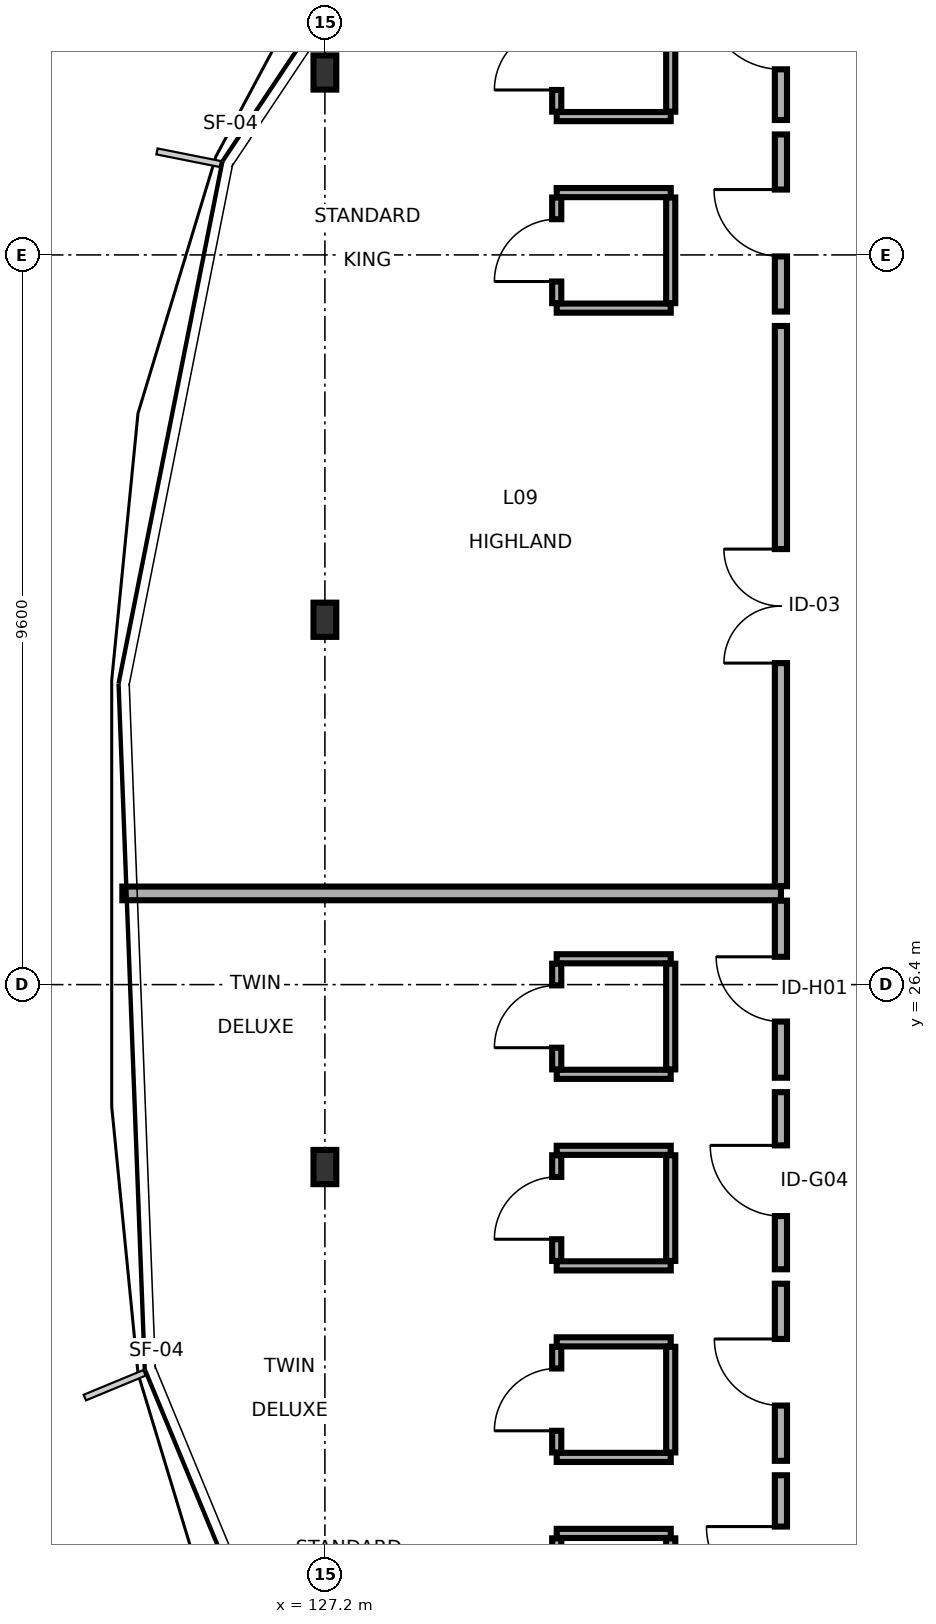
"""IFC4 building model, lengths in metres.
Left out: names, types, materials, properties, quantities, classifications, styles, units other than length and angle.
Written with IfcOpenShell. Run it as: python <this file> out.ifc"""

import sys

from ifc_helpers import new_model, si_unit, direction, frame, frame_2d, origin, origin_2d, place, context, subcontext, project, spatial, rectangle, i_section, extrude, element, fill, save


model = new_model("IFC4")
c1 = context("Model", 3, precision=1e-05, world=origin(), true_north=direction((0.0, 1.0)))
c2 = subcontext(c1, "Body", "Model", "MODEL_VIEW")
j1 = project(units=[si_unit("LENGTHUNIT", "METRE"), si_unit("PLANEANGLEUNIT", "RADIAN")], contexts=[c1])
p1 = place(None, origin())
s1 = spatial("IfcSite", under=j1, at=p1, CompositionType="ELEMENT")
p2 = place(p1, origin())
s2 = spatial("IfcBuilding", under=s1, at=p2, CompositionType="ELEMENT")
p3 = place(p2, frame((0.0, 0.0, 31.7)))
s3 = spatial("IfcBuildingStorey", under=s2, at=p3, CompositionType="ELEMENT", Elevation=31.7)
for number, where, z_axis, x_axis in (
    (1, (127.2, 38.4, 0.0), (0.0, 0.0, 1.0), (1.0, 0.0, 0.0)),
    (2, (127.2, 31.2, 0.0), (0.0, 0.0, 1.0), (1.0, 0.0, 0.0)),
    (3, (127.2, 24.0, 0.0), (0.0, 0.0, 1.0), (1.0, 0.0, 0.0)),
):
    element("IfcColumn", number, at=place(p3, frame(where, z_axis=z_axis, x_axis=x_axis)), inside=s3, PredefinedType="COLUMN", context=c2, shape_type="SweptSolid", body=[
        extrude(i_section(OverallWidth=0.3, OverallDepth=0.45, WebThickness=0.014, FlangeThickness=0.026, FilletRadius=0.027, at=origin_2d()), origin(), (0.0, 0.0, 1.0), 3.4),
    ])
p4 = place(p3, frame((133.2, 27.695, 0.0), z_axis=(0.0, 0.0, 1.0), x_axis=(0.0, 1.0, 0.0)))
e4 = element("IfcWall", 4, at=p4, inside=s3, PredefinedType="PARTITIONING", context=c2, shape_type="SweptSolid", body=[
    extrude(rectangle(XDim=7.37, YDim=0.16, at=frame_2d((3.685, 0.0))), origin(), (0.0, 0.0, 1.0), 2.755),
])
p5 = place(p4, frame((2.935, 0.0, 0.0)))
e5 = element("IfcOpeningElement", 5, at=p5, cuts=e4, PredefinedType="OPENING", context=c2, shape_type="SweptSolid", body=[
    extrude(rectangle(XDim=1.5, YDim=2.25, at=frame_2d((0.75, 1.125))), frame((0.0, 0.09, 0.0), z_axis=(0.0, -1.0, 0.0), x_axis=(1.0, 0.0, 0.0)), (0.0, 0.0, 1.0), 0.18),
])
p6 = place(p3, frame((133.2, 37.775, 0.0), z_axis=(0.0, 0.0, 1.0), x_axis=(0.0, 1.0, 0.0)))
e6 = element("IfcWall", 6, at=p6, inside=s3, PredefinedType="PARTITIONING", context=c2, shape_type="SweptSolid", body=[
    extrude(rectangle(XDim=2.33, YDim=0.16, at=frame_2d((1.165, 0.0))), origin(), (0.0, 0.0, 1.0), 2.755),
])
p7 = place(p6, frame((0.667, 0.0, 0.0)))
e7 = element("IfcOpeningElement", 7, at=p7, cuts=e6, PredefinedType="OPENING", context=c2, shape_type="SweptSolid", body=[
    extrude(rectangle(XDim=0.996, YDim=2.1, at=frame_2d((0.498, 1.05))), frame((0.0, 0.09, 0.0), z_axis=(0.0, -1.0, 0.0), x_axis=(1.0, 0.0, 0.0)), (0.0, 0.0, 1.0), 0.18),
])
p8 = place(p3, frame((130.25, 37.82, 0.0), z_axis=(0.0, 0.0, 1.0), x_axis=(1.0, 0.0, 0.0)))
e8 = element("IfcWall", 8, at=p8, inside=s3, PredefinedType="PARTITIONING", context=c2, shape_type="SweptSolid", body=[
    extrude(rectangle(XDim=1.5, YDim=0.12, at=frame_2d((0.75, 0.0))), origin(), (0.0, 0.0, 1.0), 3.17),
])
p9 = place(p3, frame((130.25, 37.885, 0.0), z_axis=(0.0, 0.0, 1.0), x_axis=(0.0, 1.0, 0.0)))
e9 = element("IfcWall", 9, at=p9, inside=s3, PredefinedType="PARTITIONING", context=c2, shape_type="SweptSolid", body=[
    extrude(rectangle(XDim=1.39, YDim=0.12, at=frame_2d((0.695, 0.0))), origin(), (0.0, 0.0, 1.0), 2.755),
])
p10 = place(p9, frame((0.285, 0.0, 0.0)))
e10 = element("IfcOpeningElement", 10, at=p10, cuts=e9, PredefinedType="OPENING", context=c2, shape_type="SweptSolid", body=[
    extrude(rectangle(XDim=0.82, YDim=2.08, at=frame_2d((0.41, 1.04))), frame((0.0, 0.07, 0.0), z_axis=(0.0, -1.0, 0.0), x_axis=(1.0, 0.0, 0.0)), (0.0, 0.0, 1.0), 0.14),
])
p11 = place(p3, frame((131.75, 37.885, 0.0), z_axis=(0.0, 0.0, 1.0), x_axis=(0.0, 1.0, 0.0)))
e11 = element("IfcWall", 11, at=p11, inside=s3, PredefinedType="PARTITIONING", context=c2, shape_type="SweptSolid", body=[
    extrude(rectangle(XDim=1.39, YDim=0.12, at=frame_2d((0.695, 0.0))), origin(), (0.0, 0.0, 1.0), 2.755),
])
p12 = place(p3, frame((133.2, 35.255, 0.0), z_axis=(0.0, 0.0, 1.0), x_axis=(0.0, 1.0, 0.0)))
e12 = element("IfcWall", 12, at=p12, inside=s3, PredefinedType="PARTITIONING", context=c2, shape_type="SweptSolid", body=[
    extrude(rectangle(XDim=2.33, YDim=0.16, at=frame_2d((1.165, 0.0))), origin(), (0.0, 0.0, 1.0), 3.17),
])
p13 = place(p12, frame((0.725, 0.0, 0.0)))
e13 = element("IfcOpeningElement", 13, at=p13, cuts=e12, PredefinedType="OPENING", context=c2, shape_type="SweptSolid", body=[
    extrude(rectangle(XDim=0.88, YDim=2.05, at=frame_2d((0.44, 1.025))), frame((0.0, 0.09, 0.0), z_axis=(0.0, -1.0, 0.0), x_axis=(1.0, 0.0, 0.0)), (0.0, 0.0, 1.0), 0.18),
])
for number, where, z_axis, x_axis in (
    (14, (130.25, 35.3, 0.0), (0.0, 0.0, 1.0), (1.0, 0.0, 0.0)),
    (15, (130.25, 36.82, 0.0), (0.0, 0.0, 1.0), (1.0, 0.0, 0.0)),
):
    element("IfcWall", number, at=place(p3, frame(where, z_axis=z_axis, x_axis=x_axis)), inside=s3, PredefinedType="PARTITIONING", context=c2, shape_type="SweptSolid", body=[
        extrude(rectangle(XDim=1.5, YDim=0.12, at=frame_2d((0.75, 0.0))), origin(), (0.0, 0.0, 1.0), 3.17),
    ])
p14 = place(p3, frame((130.25, 35.365, 0.0), z_axis=(0.0, 0.0, 1.0), x_axis=(0.0, 1.0, 0.0)))
e16 = element("IfcWall", 16, at=p14, inside=s3, PredefinedType="PARTITIONING", context=c2, shape_type="SweptSolid", body=[
    extrude(rectangle(XDim=1.39, YDim=0.12, at=frame_2d((0.695, 0.0))), origin(), (0.0, 0.0, 1.0), 3.17),
])
p15 = place(p14, frame((0.285, 0.0, 0.0)))
e17 = element("IfcOpeningElement", 17, at=p15, cuts=e16, PredefinedType="OPENING", context=c2, shape_type="SweptSolid", body=[
    extrude(rectangle(XDim=0.82, YDim=2.08, at=frame_2d((0.41, 1.04))), frame((0.0, 0.07, 0.0), z_axis=(0.0, -1.0, 0.0), x_axis=(1.0, 0.0, 0.0)), (0.0, 0.0, 1.0), 0.14),
])
p16 = place(p3, frame((131.75, 35.365, 0.0), z_axis=(0.0, 0.0, 1.0), x_axis=(0.0, 1.0, 0.0)))
e18 = element("IfcWall", 18, at=p16, inside=s3, PredefinedType="PARTITIONING", context=c2, shape_type="SweptSolid", body=[
    extrude(rectangle(XDim=1.39, YDim=0.12, at=frame_2d((0.695, 0.0))), origin(), (0.0, 0.0, 1.0), 3.17),
])
p17 = place(p3, frame((133.2, 25.175, 0.0), z_axis=(0.0, 0.0, 1.0), x_axis=(0.0, 1.0, 0.0)))
e19 = element("IfcWall", 19, at=p17, inside=s3, PredefinedType="PARTITIONING", context=c2, shape_type="SweptSolid", body=[
    extrude(rectangle(XDim=2.33, YDim=0.16, at=frame_2d((1.165, 0.0))), origin(), (0.0, 0.0, 1.0), 3.17),
])
p18 = place(p17, frame((0.739, 0.0, 0.0)))
e20 = element("IfcOpeningElement", 20, at=p18, cuts=e19, PredefinedType="OPENING", context=c2, shape_type="SweptSolid", body=[
    extrude(rectangle(XDim=0.852, YDim=2.1, at=frame_2d((0.426, 1.05))), frame((0.0, 0.09, 0.0), z_axis=(0.0, -1.0, 0.0), x_axis=(1.0, 0.0, 0.0)), (0.0, 0.0, 1.0), 0.18),
])
for number, where, z_axis, x_axis in (
    (21, (130.25, 25.22, 0.0), (0.0, 0.0, 1.0), (1.0, 0.0, 0.0)),
    (22, (130.25, 26.74, 0.0), (0.0, 0.0, 1.0), (1.0, 0.0, 0.0)),
):
    element("IfcWall", number, at=place(p3, frame(where, z_axis=z_axis, x_axis=x_axis)), inside=s3, PredefinedType="PARTITIONING", context=c2, shape_type="SweptSolid", body=[
        extrude(rectangle(XDim=1.5, YDim=0.12, at=frame_2d((0.75, 0.0))), origin(), (0.0, 0.0, 1.0), 3.17),
    ])
p19 = place(p3, frame((130.25, 25.285, 0.0), z_axis=(0.0, 0.0, 1.0), x_axis=(0.0, 1.0, 0.0)))
e23 = element("IfcWall", 23, at=p19, inside=s3, PredefinedType="PARTITIONING", context=c2, shape_type="SweptSolid", body=[
    extrude(rectangle(XDim=1.39, YDim=0.12, at=frame_2d((0.695, 0.0))), origin(), (0.0, 0.0, 1.0), 3.17),
])
p20 = place(p19, frame((0.285, 0.0, 0.0)))
e24 = element("IfcOpeningElement", 24, at=p20, cuts=e23, PredefinedType="OPENING", context=c2, shape_type="SweptSolid", body=[
    extrude(rectangle(XDim=0.82, YDim=2.08, at=frame_2d((0.41, 1.04))), frame((0.0, 0.07, 0.0), z_axis=(0.0, -1.0, 0.0), x_axis=(1.0, 0.0, 0.0)), (0.0, 0.0, 1.0), 0.14),
])
p21 = place(p3, frame((131.75, 25.285, 0.0), z_axis=(0.0, 0.0, 1.0), x_axis=(0.0, 1.0, 0.0)))
e25 = element("IfcWall", 25, at=p21, inside=s3, PredefinedType="PARTITIONING", context=c2, shape_type="SweptSolid", body=[
    extrude(rectangle(XDim=1.39, YDim=0.12, at=frame_2d((0.695, 0.0))), origin(), (0.0, 0.0, 1.0), 3.17),
])
p22 = place(p3, frame((124.535, 27.6, 0.0), z_axis=(0.0, 0.0, 1.0), x_axis=(1.0, 0.0, 0.0)))
e26 = element("IfcWall", 26, at=p22, inside=s3, PredefinedType="PARTITIONING", context=c2, shape_type="SweptSolid", body=[
    extrude(rectangle(XDim=8.665, YDim=0.18, at=frame_2d((4.333, 0.0))), origin(), (0.0, 0.0, 1.0), 2.655),
])
p23 = place(p3, frame((133.2, 22.655, 0.0), z_axis=(0.0, 0.0, 1.0), x_axis=(0.0, 1.0, 0.0)))
e27 = element("IfcWall", 27, at=p23, inside=s3, PredefinedType="PARTITIONING", context=c2, shape_type="SweptSolid", body=[
    extrude(rectangle(XDim=2.33, YDim=0.16, at=frame_2d((1.165, 0.0))), origin(), (0.0, 0.0, 1.0), 2.755),
])
p24 = place(p23, frame((0.7, 0.0, 0.0)))
e28 = element("IfcOpeningElement", 28, at=p24, cuts=e27, PredefinedType="OPENING", context=c2, shape_type="SweptSolid", body=[
    extrude(rectangle(XDim=0.93, YDim=2.05, at=frame_2d((0.465, 1.025))), frame((0.0, 0.09, 0.0), z_axis=(0.0, -1.0, 0.0), x_axis=(1.0, 0.0, 0.0)), (0.0, 0.0, 1.0), 0.18),
])
p25 = place(p3, frame((130.25, 22.7, 0.0), z_axis=(0.0, 0.0, 1.0), x_axis=(1.0, 0.0, 0.0)))
e29 = element("IfcWall", 29, at=p25, inside=s3, PredefinedType="PARTITIONING", context=c2, shape_type="SweptSolid", body=[
    extrude(rectangle(XDim=1.5, YDim=0.12, at=frame_2d((0.75, 0.0))), origin(), (0.0, 0.0, 1.0), 3.17),
])
p26 = place(p3, frame((130.25, 24.22, 0.0), z_axis=(0.0, 0.0, 1.0), x_axis=(1.0, 0.0, 0.0)))
e30 = element("IfcWall", 30, at=p26, inside=s3, PredefinedType="PARTITIONING", context=c2, shape_type="SweptSolid", body=[
    extrude(rectangle(XDim=1.5, YDim=0.12, at=frame_2d((0.75, 0.0))), origin(), (0.0, 0.0, 1.0), 2.755),
])
p27 = place(p3, frame((130.25, 22.765, 0.0), z_axis=(0.0, 0.0, 1.0), x_axis=(0.0, 1.0, 0.0)))
e31 = element("IfcWall", 31, at=p27, inside=s3, PredefinedType="PARTITIONING", context=c2, shape_type="SweptSolid", body=[
    extrude(rectangle(XDim=1.39, YDim=0.12, at=frame_2d((0.695, 0.0))), origin(), (0.0, 0.0, 1.0), 2.755),
])
p28 = place(p27, frame((0.285, 0.0, 0.0)))
e32 = element("IfcOpeningElement", 32, at=p28, cuts=e31, PredefinedType="OPENING", context=c2, shape_type="SweptSolid", body=[
    extrude(rectangle(XDim=0.82, YDim=2.08, at=frame_2d((0.41, 1.04))), frame((0.0, 0.07, 0.0), z_axis=(0.0, -1.0, 0.0), x_axis=(1.0, 0.0, 0.0)), (0.0, 0.0, 1.0), 0.14),
])
p29 = place(p3, frame((131.75, 22.765, 0.0), z_axis=(0.0, 0.0, 1.0), x_axis=(0.0, 1.0, 0.0)))
e33 = element("IfcWall", 33, at=p29, inside=s3, PredefinedType="PARTITIONING", context=c2, shape_type="SweptSolid", body=[
    extrude(rectangle(XDim=1.39, YDim=0.12, at=frame_2d((0.695, 0.0))), origin(), (0.0, 0.0, 1.0), 2.755),
])
p30 = place(p3, frame((133.2, 20.135, 0.0), z_axis=(0.0, 0.0, 1.0), x_axis=(0.0, 1.0, 0.0)))
e34 = element("IfcWall", 34, at=p30, inside=s3, PredefinedType="PARTITIONING", context=c2, shape_type="SweptSolid", body=[
    extrude(rectangle(XDim=2.33, YDim=0.16, at=frame_2d((1.165, 0.0))), origin(), (0.0, 0.0, 1.0), 3.17),
])
p31 = place(p30, frame((0.727, 0.0, 0.0)))
e35 = element("IfcOpeningElement", 35, at=p31, cuts=e34, PredefinedType="OPENING", context=c2, shape_type="SweptSolid", body=[
    extrude(rectangle(XDim=0.876, YDim=2.16, at=frame_2d((0.438, 1.08))), frame((0.0, 0.09, 0.0), z_axis=(0.0, -1.0, 0.0), x_axis=(1.0, 0.0, 0.0)), (0.0, 0.0, 1.0), 0.18),
])
for number, where, z_axis, x_axis in (
    (36, (130.25, 20.18, 0.0), (0.0, 0.0, 1.0), (1.0, 0.0, 0.0)),
    (37, (130.25, 21.7, 0.0), (0.0, 0.0, 1.0), (1.0, 0.0, 0.0)),
):
    element("IfcWall", number, at=place(p3, frame(where, z_axis=z_axis, x_axis=x_axis)), inside=s3, PredefinedType="PARTITIONING", context=c2, shape_type="SweptSolid", body=[
        extrude(rectangle(XDim=1.5, YDim=0.12, at=frame_2d((0.75, 0.0))), origin(), (0.0, 0.0, 1.0), 3.17),
    ])
p32 = place(p3, frame((130.25, 20.245, 0.0), z_axis=(0.0, 0.0, 1.0), x_axis=(0.0, 1.0, 0.0)))
e38 = element("IfcWall", 38, at=p32, inside=s3, PredefinedType="PARTITIONING", context=c2, shape_type="SweptSolid", body=[
    extrude(rectangle(XDim=1.39, YDim=0.12, at=frame_2d((0.695, 0.0))), origin(), (0.0, 0.0, 1.0), 3.17),
])
p33 = place(p32, frame((0.285, 0.0, 0.0)))
e39 = element("IfcOpeningElement", 39, at=p33, cuts=e38, PredefinedType="OPENING", context=c2, shape_type="SweptSolid", body=[
    extrude(rectangle(XDim=0.82, YDim=2.08, at=frame_2d((0.41, 1.04))), frame((0.0, 0.07, 0.0), z_axis=(0.0, -1.0, 0.0), x_axis=(1.0, 0.0, 0.0)), (0.0, 0.0, 1.0), 0.14),
])
p34 = place(p3, frame((131.75, 20.245, 0.0), z_axis=(0.0, 0.0, 1.0), x_axis=(0.0, 1.0, 0.0)))
e40 = element("IfcWall", 40, at=p34, inside=s3, PredefinedType="PARTITIONING", context=c2, shape_type="SweptSolid", body=[
    extrude(rectangle(XDim=1.39, YDim=0.12, at=frame_2d((0.695, 0.0))), origin(), (0.0, 0.0, 1.0), 3.17),
])
p35 = place(p3, frame((133.2, 17.615, 0.0), z_axis=(0.0, 0.0, 1.0), x_axis=(0.0, 1.0, 0.0)))
e41 = element("IfcWall", 41, at=p35, inside=s3, PredefinedType="PARTITIONING", context=c2, shape_type="SweptSolid", body=[
    extrude(rectangle(XDim=2.33, YDim=0.16, at=frame_2d((1.165, 0.0))), origin(), (0.0, 0.0, 1.0), 3.17),
])
p36 = place(p35, frame((0.675, 0.0, 0.0)))
e42 = element("IfcOpeningElement", 42, at=p36, cuts=e41, PredefinedType="OPENING", context=c2, shape_type="SweptSolid", body=[
    extrude(rectangle(XDim=0.98, YDim=2.05, at=frame_2d((0.49, 1.025))), frame((0.0, 0.09, 0.0), z_axis=(0.0, -1.0, 0.0), x_axis=(1.0, 0.0, 0.0)), (0.0, 0.0, 1.0), 0.18),
])
p37 = place(p3, frame((130.25, 19.18, 0.0), z_axis=(0.0, 0.0, 1.0), x_axis=(1.0, 0.0, 0.0)))
e43 = element("IfcWall", 43, at=p37, inside=s3, PredefinedType="PARTITIONING", context=c2, shape_type="SweptSolid", body=[
    extrude(rectangle(XDim=1.5, YDim=0.12, at=frame_2d((0.75, 0.0))), origin(), (0.0, 0.0, 1.0), 3.17),
])
p38 = place(p3, frame((130.25, 17.725, 0.0), z_axis=(0.0, 0.0, 1.0), x_axis=(0.0, 1.0, 0.0)))
e44 = element("IfcWall", 44, at=p38, inside=s3, PredefinedType="PARTITIONING", context=c2, shape_type="SweptSolid", body=[
    extrude(rectangle(XDim=1.39, YDim=0.12, at=frame_2d((0.695, 0.0))), origin(), (0.0, 0.0, 1.0), 3.17),
])
p39 = place(p38, frame((0.285, 0.0, 0.0)))
e45 = element("IfcOpeningElement", 45, at=p39, cuts=e44, PredefinedType="OPENING", context=c2, shape_type="SweptSolid", body=[
    extrude(rectangle(XDim=0.82, YDim=2.08, at=frame_2d((0.41, 1.04))), frame((0.0, 0.07, 0.0), z_axis=(0.0, -1.0, 0.0), x_axis=(1.0, 0.0, 0.0)), (0.0, 0.0, 1.0), 0.14),
])
p40 = place(p3, frame((131.75, 17.725, 0.0), z_axis=(0.0, 0.0, 1.0), x_axis=(0.0, 1.0, 0.0)))
e46 = element("IfcWall", 46, at=p40, inside=s3, PredefinedType="PARTITIONING", context=c2, shape_type="SweptSolid", body=[
    extrude(rectangle(XDim=1.39, YDim=0.12, at=frame_2d((0.695, 0.0))), origin(), (0.0, 0.0, 1.0), 3.17),
])
p41 = place(p5, origin())
e47 = element("IfcDoor", 47, at=p41, inside=s3, OperationType="DOUBLE_DOOR_SINGLE_SWING", PredefinedType="DOOR", context=c2, shape_type="SweptSolid", body=[
    extrude(rectangle(XDim=1.5, YDim=2.25, at=frame_2d((0.75, 1.125))), frame((0.0, 0.025, 0.0), z_axis=(0.0, -1.0, 0.0), x_axis=(1.0, 0.0, 0.0)), (0.0, 0.0, 1.0), 0.05),
])
fill(e5, e47)
p42 = place(p7, origin())
e48 = element("IfcDoor", 48, at=p42, inside=s3, OperationType="SINGLE_SWING_RIGHT", PredefinedType="DOOR", context=c2, shape_type="SweptSolid", body=[
    extrude(rectangle(XDim=0.996, YDim=2.1, at=frame_2d((0.498, 1.05))), frame((0.0, 0.025, 0.0), z_axis=(0.0, -1.0, 0.0), x_axis=(1.0, 0.0, 0.0)), (0.0, 0.0, 1.0), 0.05),
])
fill(e7, e48)
p43 = place(p10, origin())
e49 = element("IfcDoor", 49, at=p43, inside=s3, OperationType="SINGLE_SWING_LEFT", PredefinedType="DOOR", context=c2, shape_type="SweptSolid", body=[
    extrude(rectangle(XDim=0.82, YDim=2.08, at=frame_2d((0.41, 1.04))), frame((0.0, 0.025, 0.0), z_axis=(0.0, -1.0, 0.0), x_axis=(1.0, 0.0, 0.0)), (0.0, 0.0, 1.0), 0.05),
])
fill(e10, e49)
p44 = place(p13, origin())
e50 = element("IfcDoor", 50, at=p44, inside=s3, OperationType="SINGLE_SWING_RIGHT", PredefinedType="DOOR", context=c2, shape_type="SweptSolid", body=[
    extrude(rectangle(XDim=0.88, YDim=2.05, at=frame_2d((0.44, 1.025))), frame((0.0, 0.025, 0.0), z_axis=(0.0, -1.0, 0.0), x_axis=(1.0, 0.0, 0.0)), (0.0, 0.0, 1.0), 0.05),
])
fill(e13, e50)
p45 = place(p15, origin())
e51 = element("IfcDoor", 51, at=p45, inside=s3, OperationType="SINGLE_SWING_LEFT", PredefinedType="DOOR", context=c2, shape_type="SweptSolid", body=[
    extrude(rectangle(XDim=0.82, YDim=2.08, at=frame_2d((0.41, 1.04))), frame((0.0, 0.025, 0.0), z_axis=(0.0, -1.0, 0.0), x_axis=(1.0, 0.0, 0.0)), (0.0, 0.0, 1.0), 0.05),
])
fill(e17, e51)
p46 = place(p18, origin())
e52 = element("IfcDoor", 52, at=p46, inside=s3, OperationType="SINGLE_SWING_RIGHT", PredefinedType="DOOR", context=c2, shape_type="SweptSolid", body=[
    extrude(rectangle(XDim=0.852, YDim=2.1, at=frame_2d((0.426, 1.05))), frame((0.0, 0.025, 0.0), z_axis=(0.0, -1.0, 0.0), x_axis=(1.0, 0.0, 0.0)), (0.0, 0.0, 1.0), 0.05),
])
fill(e20, e52)
p47 = place(p20, origin())
e53 = element("IfcDoor", 53, at=p47, inside=s3, OperationType="SINGLE_SWING_LEFT", PredefinedType="DOOR", context=c2, shape_type="SweptSolid", body=[
    extrude(rectangle(XDim=0.82, YDim=2.08, at=frame_2d((0.41, 1.04))), frame((0.0, 0.025, 0.0), z_axis=(0.0, -1.0, 0.0), x_axis=(1.0, 0.0, 0.0)), (0.0, 0.0, 1.0), 0.05),
])
fill(e24, e53)
p48 = place(p24, origin())
e54 = element("IfcDoor", 54, at=p48, inside=s3, OperationType="SINGLE_SWING_RIGHT", PredefinedType="DOOR", context=c2, shape_type="SweptSolid", body=[
    extrude(rectangle(XDim=0.93, YDim=2.05, at=frame_2d((0.465, 1.025))), frame((0.0, 0.025, 0.0), z_axis=(0.0, -1.0, 0.0), x_axis=(1.0, 0.0, 0.0)), (0.0, 0.0, 1.0), 0.05),
])
fill(e28, e54)
p49 = place(p28, origin())
e55 = element("IfcDoor", 55, at=p49, inside=s3, OperationType="SINGLE_SWING_LEFT", PredefinedType="DOOR", context=c2, shape_type="SweptSolid", body=[
    extrude(rectangle(XDim=0.82, YDim=2.08, at=frame_2d((0.41, 1.04))), frame((0.0, 0.025, 0.0), z_axis=(0.0, -1.0, 0.0), x_axis=(1.0, 0.0, 0.0)), (0.0, 0.0, 1.0), 0.05),
])
fill(e32, e55)
p50 = place(p31, origin())
e56 = element("IfcDoor", 56, at=p50, inside=s3, OperationType="SINGLE_SWING_RIGHT", PredefinedType="DOOR", context=c2, shape_type="SweptSolid", body=[
    extrude(rectangle(XDim=0.876, YDim=2.16, at=frame_2d((0.438, 1.08))), frame((0.0, 0.025, 0.0), z_axis=(0.0, -1.0, 0.0), x_axis=(1.0, 0.0, 0.0)), (0.0, 0.0, 1.0), 0.05),
])
fill(e35, e56)
p51 = place(p33, origin())
e57 = element("IfcDoor", 57, at=p51, inside=s3, OperationType="SINGLE_SWING_LEFT", PredefinedType="DOOR", context=c2, shape_type="SweptSolid", body=[
    extrude(rectangle(XDim=0.82, YDim=2.08, at=frame_2d((0.41, 1.04))), frame((0.0, 0.025, 0.0), z_axis=(0.0, -1.0, 0.0), x_axis=(1.0, 0.0, 0.0)), (0.0, 0.0, 1.0), 0.05),
])
fill(e39, e57)
p52 = place(p36, origin())
e58 = element("IfcDoor", 58, at=p52, inside=s3, OperationType="SINGLE_SWING_RIGHT", PredefinedType="DOOR", context=c2, shape_type="SweptSolid", body=[
    extrude(rectangle(XDim=0.98, YDim=2.05, at=frame_2d((0.49, 1.025))), frame((0.0, 0.025, 0.0), z_axis=(0.0, -1.0, 0.0), x_axis=(1.0, 0.0, 0.0)), (0.0, 0.0, 1.0), 0.05),
])
fill(e42, e58)
save(model, sys.argv[1])
